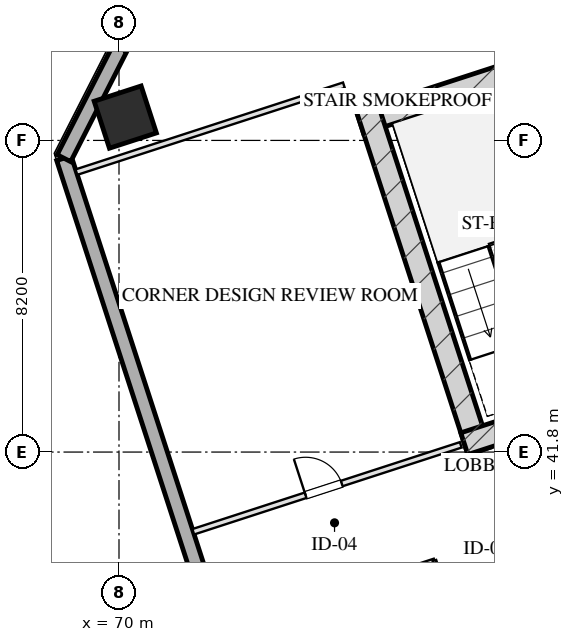
"""IFC4 building model, lengths in metres.
Left out: names, types, materials, properties, quantities, classifications, styles, units other than length and angle.
Written with IfcOpenShell. Run it as: python <this file> out.ifc"""

import sys

from ifc_helpers import new_model, si_unit, direction, frame, frame_2d, origin, origin_2d, place, context, subcontext, project, spatial, rectangle, hollow_rectangle, extrude, element, fill, save


model = new_model("IFC4")
c1 = context("Model", 3, precision=1e-05, world=origin(), true_north=direction((0.0, 1.0)))
c2 = subcontext(c1, "Body", "Model", "MODEL_VIEW")
j1 = project(units=[si_unit("LENGTHUNIT", "METRE"), si_unit("PLANEANGLEUNIT", "RADIAN")], contexts=[c1])
p1 = place(None, origin())
s1 = spatial("IfcSite", under=j1, at=p1, CompositionType="ELEMENT")
p2 = place(p1, origin())
s2 = spatial("IfcBuilding", under=s1, at=p2, CompositionType="ELEMENT")
p3 = place(p2, frame((0.0, 0.0, 149.5)))
s3 = spatial("IfcBuildingStorey", under=s2, at=p3, CompositionType="ELEMENT", Elevation=149.5)
p4 = place(p3, frame((76.344, 50.466, 0.0), z_axis=(0.0, 0.0, 1.0), x_axis=(0.951055727519, 0.309019421968, 0.0)))
e1 = element("IfcWall", 1, at=p4, inside=s3, PredefinedType="SHEAR", context=c2, shape_type="SweptSolid", body=[
    extrude(rectangle(XDim=16.4, YDim=0.6, at=frame_2d((8.2, 0.0))), origin(), (0.0, 0.0, 1.0), 3.45),
])
p5 = place(p3, frame((79.466, 41.828, 0.0), z_axis=(0.0, 0.0, 1.0), x_axis=(-0.309041232772, 0.951048640421, 0.0)))
e2 = element("IfcWall", 2, at=p5, inside=s3, PredefinedType="SHEAR", context=c2, shape_type="SweptSolid", body=[
    extrude(rectangle(XDim=9.48, YDim=0.6, at=frame_2d((4.74, 0.0))), origin(), (0.0, 0.0, 1.0), 3.45),
])
p6 = place(p3, frame((79.087, 42.021, 0.0), z_axis=(0.0, 0.0, 1.0), x_axis=(0.951062550203, 0.3089984233, 0.0)))
e3 = element("IfcWall", 3, at=p6, inside=s3, PredefinedType="SHEAR", context=c2, shape_type="SweptSolid", body=[
    extrude(rectangle(XDim=4.22, YDim=0.6, at=frame_2d((2.11, 0.0))), origin(), (0.0, 0.0, 1.0), 3.45),
])
p7 = place(p3, frame((70.165, 50.614, 0.0), z_axis=(0.0, 0.0, 1.0), x_axis=(0.951056516295, 0.309016994375, 0.0)))
e4 = element("IfcColumn", 4, at=p7, inside=s3, PredefinedType="COLUMN", context=c2, shape_type="SweptSolid", body=[
    extrude(hollow_rectangle(XDim=1.3, YDim=1.3, WallThickness=0.045, at=origin_2d()), origin(), (0.0, 0.0, 1.0), 3.451),
])
p8 = place(p3, frame((81.776, 8.827, 0.0), z_axis=(0.0, 0.0, 1.0), x_axis=(-0.309014228706, 0.951057414911, 0.0)))
e5 = element("IfcWall", 5, at=p8, inside=s3, PredefinedType="SOLIDWALL", context=c2, shape_type="SweptSolid", body=[
    extrude(rectangle(XDim=42.8, YDim=0.4, at=frame_2d((21.4, 0.0))), origin(), (0.0, 0.0, 1.0), 2.61),
])
p9 = place(p3, frame((68.551, 49.532, 0.0), z_axis=(0.0, 0.0, 1.0), x_axis=(0.454019523198, 0.890991735402, 0.0)))
e6 = element("IfcWall", 6, at=p9, inside=s3, PredefinedType="SOLIDWALL", context=c2, shape_type="SweptSolid", body=[
    extrude(rectangle(XDim=3.394, YDim=0.4, at=frame_2d((1.697, 0.0))), origin(), (0.0, 0.0, 1.0), 2.61),
])
p10 = place(p3, frame((68.88, 49.166, 0.0), z_axis=(0.0, 0.0, 1.0), x_axis=(0.951060977215, 0.309003264738, 0.0)))
e7 = element("IfcWall", 7, at=p10, inside=s3, PredefinedType="PARTITIONING", context=c2, shape_type="SweptSolid", body=[
    extrude(rectangle(XDim=7.4, YDim=0.15, at=frame_2d((3.7, 0.0))), origin(), (0.0, 0.0, 1.0), 3.175),
])
p11 = place(p3, frame((71.955, 39.703, 0.0), z_axis=(0.0, 0.0, 1.0), x_axis=(0.951060977215, 0.309003264738, 0.0)))
e8 = element("IfcWall", 8, at=p11, inside=s3, PredefinedType="PARTITIONING", context=c2, shape_type="SweptSolid", body=[
    extrude(rectangle(XDim=7.4, YDim=0.15, at=frame_2d((3.7, 0.0))), origin(), (0.0, 0.0, 1.0), 3.175),
])
p12 = place(p11, frame((3.108, 0.0, 0.0)))
e9 = element("IfcOpeningElement", 9, at=p12, cuts=e8, PredefinedType="OPENING", context=c2, shape_type="SweptSolid", body=[
    extrude(rectangle(XDim=1.0, YDim=2.05, at=frame_2d((0.5, 1.025))), frame((0.0, 0.085, 0.0), z_axis=(0.0, -1.0, 0.0), x_axis=(1.0, 0.0, 0.0)), (0.0, 0.0, 1.0), 0.17),
])
p13 = place(p3, frame((72.783, 37.154, 0.0), z_axis=(0.0, 0.0, 1.0), x_axis=(0.951047059821, 0.309046096893, 0.0)))
e10 = element("IfcWall", 10, at=p13, inside=s3, PredefinedType="MOVABLE", context=c2, shape_type="SweptSolid", body=[
    extrude(rectangle(XDim=5.8, YDim=0.1, at=frame_2d((2.9, 0.0))), origin(), (0.0, 0.0, 1.0), 3.175),
])
p14 = place(p3, frame((83.441, 23.121, 0.0), z_axis=(0.0, 0.0, 1.0), x_axis=(-0.30901773025, 0.951056277195, 0.0)))
e11 = element("IfcWall", 11, at=p14, inside=s3, PredefinedType="MOVABLE", context=c2, shape_type="SweptSolid", body=[
    extrude(rectangle(XDim=16.64, YDim=0.1, at=frame_2d((8.32, 0.0))), origin(), (0.0, 0.0, 1.0), 3.175),
])
p15 = place(p14, frame((1.143, 0.0, 0.0)))
e12 = element("IfcOpeningElement", 12, at=p15, cuts=e11, PredefinedType="OPENING", context=c2, shape_type="SweptSolid", body=[
    extrude(rectangle(XDim=1.0, YDim=2.05, at=frame_2d((0.5, 1.025))), frame((0.0, 0.06, 0.0), z_axis=(0.0, -1.0, 0.0), x_axis=(1.0, 0.0, 0.0)), (0.0, 0.0, 1.0), 0.12),
])
p16 = place(p14, frame((4.703, 0.0, 0.0)))
e13 = element("IfcOpeningElement", 13, at=p16, cuts=e11, PredefinedType="OPENING", context=c2, shape_type="SweptSolid", body=[
    extrude(rectangle(XDim=1.0, YDim=2.05, at=frame_2d((0.5, 1.025))), frame((0.0, 0.06, 0.0), z_axis=(0.0, -1.0, 0.0), x_axis=(1.0, 0.0, 0.0)), (0.0, 0.0, 1.0), 0.12),
])
p17 = place(p14, frame((7.82, 0.0, 0.0)))
e14 = element("IfcOpeningElement", 14, at=p17, cuts=e11, PredefinedType="OPENING", context=c2, shape_type="SweptSolid", body=[
    extrude(rectangle(XDim=1.0, YDim=2.05, at=frame_2d((0.5, 1.025))), frame((0.0, 0.06, 0.0), z_axis=(0.0, -1.0, 0.0), x_axis=(1.0, 0.0, 0.0)), (0.0, 0.0, 1.0), 0.12),
])
p18 = place(p14, frame((10.92, 0.0, 0.0)))
e15 = element("IfcOpeningElement", 15, at=p18, cuts=e11, PredefinedType="OPENING", context=c2, shape_type="SweptSolid", body=[
    extrude(rectangle(XDim=1.05, YDim=2.05, at=frame_2d((0.525, 1.025))), frame((0.0, 0.06, 0.0), z_axis=(0.0, -1.0, 0.0), x_axis=(1.0, 0.0, 0.0)), (0.0, 0.0, 1.0), 0.12),
])
p19 = place(p14, frame((14.48, 0.0, 0.0)))
e16 = element("IfcOpeningElement", 16, at=p19, cuts=e11, PredefinedType="OPENING", context=c2, shape_type="SweptSolid", body=[
    extrude(rectangle(XDim=1.0, YDim=2.05, at=frame_2d((0.5, 1.025))), frame((0.0, 0.06, 0.0), z_axis=(0.0, -1.0, 0.0), x_axis=(1.0, 0.0, 0.0)), (0.0, 0.0, 1.0), 0.12),
])
p20 = place(p12, origin())
e17 = element("IfcDoor", 17, at=p20, inside=s3, OperationType="SINGLE_SWING_LEFT", PredefinedType="DOOR", context=c2, shape_type="SweptSolid", body=[
    extrude(rectangle(XDim=1.0, YDim=2.05, at=frame_2d((0.5, 1.025))), frame((0.0, 0.025, 0.0), z_axis=(0.0, -1.0, 0.0), x_axis=(1.0, 0.0, 0.0)), (0.0, 0.0, 1.0), 0.05),
])
fill(e9, e17)
save(model, sys.argv[1])
